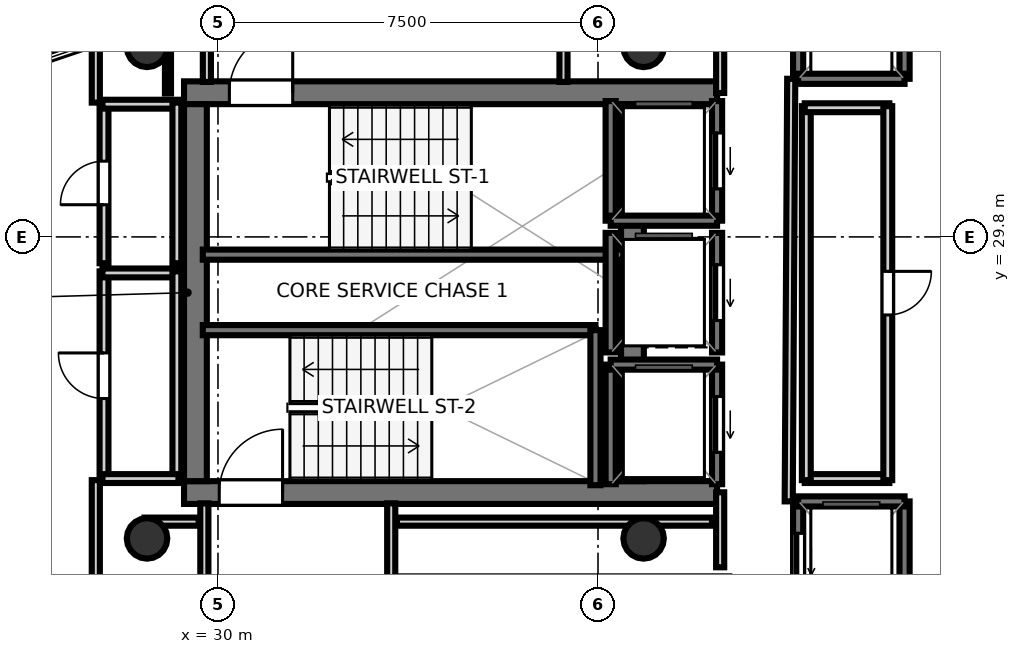
"""IFC4 building model, lengths in metres.
Left out: names, types, materials, properties, quantities, classifications, styles, units other than length and angle.
Written with IfcOpenShell. Run it as: python <this file> out.ifc"""

import sys

from ifc_helpers import new_model, si_unit, direction, frame, frame_2d, origin, origin_2d, place, context, subcontext, project, spatial, rectangle, hollow_circle, extrude, element, fill, save


model = new_model("IFC4")
c1 = context("Model", 3, precision=1e-05, world=origin(), true_north=direction((0.0, 1.0)))
c2 = subcontext(c1, "Body", "Model", "MODEL_VIEW")
j1 = project(units=[si_unit("LENGTHUNIT", "METRE"), si_unit("PLANEANGLEUNIT", "RADIAN")], contexts=[c1])
p1 = place(None, origin())
s1 = spatial("IfcSite", under=j1, at=p1, CompositionType="ELEMENT")
p2 = place(p1, origin())
s2 = spatial("IfcBuilding", under=s1, at=p2, CompositionType="ELEMENT")
p3 = place(p2, frame((0.0, 0.0, 333.3)))
s3 = spatial("IfcBuildingStorey", under=s2, at=p3, CompositionType="ELEMENT", Elevation=333.3)
p4 = place(p3, frame((29.33, 32.645, 0.0), z_axis=(0.0, 0.0, 1.0), x_axis=(1.0, 0.0, 0.0)))
e1 = element("IfcWall", 1, at=p4, inside=s3, PredefinedType="SHEAR", context=c2, shape_type="SweptSolid", body=[
    extrude(rectangle(XDim=10.52, YDim=0.45, at=frame_2d((5.26, 0.0))), origin(), (0.0, 0.0, 1.0), 3.52),
])
p5 = place(p4, frame((0.895, 0.0, 0.0)))
e2 = element("IfcOpeningElement", 2, at=p5, cuts=e1, PredefinedType="OPENING", context=c2, shape_type="SweptSolid", body=[
    extrude(rectangle(XDim=1.25, YDim=2.15, at=frame_2d((0.625, 1.075))), frame((0.0, 0.235, 0.0), z_axis=(0.0, -1.0, 0.0), x_axis=(1.0, 0.0, 0.0)), (0.0, 0.0, 1.0), 0.47),
])
p6 = place(p3, frame((29.33, 24.755, 0.0), z_axis=(0.0, 0.0, 1.0), x_axis=(1.0, 0.0, 0.0)))
e3 = element("IfcWall", 3, at=p6, inside=s3, PredefinedType="SHEAR", context=c2, shape_type="SweptSolid", body=[
    extrude(rectangle(XDim=10.52, YDim=0.45, at=frame_2d((5.26, 0.0))), origin(), (0.0, 0.0, 1.0), 3.52),
])
p7 = place(p6, frame((0.695, 0.0, 0.0)))
e4 = element("IfcOpeningElement", 4, at=p7, cuts=e3, PredefinedType="OPENING", context=c2, shape_type="SweptSolid", body=[
    extrude(rectangle(XDim=1.25, YDim=2.15, at=frame_2d((0.625, 1.075))), frame((0.0, 0.235, 0.0), z_axis=(0.0, -1.0, 0.0), x_axis=(1.0, 0.0, 0.0)), (0.0, 0.0, 1.0), 0.47),
])
for number, where, z_axis, x_axis in (
    (5, (29.555, 24.98, 0.0), (0.0, 0.0, 1.0), (0.0, 1.0, 0.0)),
    (6, (38.18, 24.98, 0.0), (0.0, 0.0, 1.0), (0.0, 1.0, 0.0)),
):
    element("IfcWall", number, at=place(p3, frame(where, z_axis=z_axis, x_axis=x_axis)), inside=s3, PredefinedType="SHEAR", context=c2, shape_type="SweptSolid", body=[
        extrude(rectangle(XDim=7.44, YDim=0.45, at=frame_2d((3.72, 0.0))), origin(), (0.0, 0.0, 1.0), 3.52),
    ])
for number, where, z_axis, x_axis in (
    (7, (28.6, 33.55, 0.0), (0.0, 0.0, 1.0), (1.0, 0.0, 0.0)),
    (8, (28.6, 23.85, 0.0), (0.0, 0.0, 1.0), (1.0, 0.0, 0.0)),
    (9, (38.4, 33.55, 0.0), (0.0, 0.0, 1.0), (1.0, 0.0, 0.0)),
    (10, (38.4, 23.85, 0.0), (0.0, 0.0, 1.0), (1.0, 0.0, 0.0)),
):
    element("IfcColumn", number, at=place(p3, frame(where, z_axis=z_axis, x_axis=x_axis)), inside=s3, PredefinedType="COLUMN", context=c2, shape_type="SweptSolid", body=[
        extrude(hollow_circle(Radius=0.4, WallThickness=0.022, at=origin_2d()), origin(), (0.0, 0.0, 1.0), 3.7),
    ])
p8 = place(p3, frame((29.7, 29.45, 0.0), z_axis=(0.0, 0.0, 1.0), x_axis=(1.0, 0.0, 0.0)))
e11 = element("IfcWall", 11, at=p8, inside=s3, PredefinedType="SOLIDWALL", context=c2, shape_type="SweptSolid", body=[
    extrude(rectangle(XDim=8.3, YDim=0.2, at=frame_2d((4.15, 0.0))), origin(), (0.0, 0.0, 1.0), 3.52),
])
p9 = place(p3, frame((29.7, 27.96, 0.0), z_axis=(0.0, 0.0, 1.0), x_axis=(1.0, 0.0, 0.0)))
e12 = element("IfcWall", 12, at=p9, inside=s3, PredefinedType="SOLIDWALL", context=c2, shape_type="SweptSolid", body=[
    extrude(rectangle(XDim=7.75, YDim=0.2, at=frame_2d((3.875, 0.0))), origin(), (0.0, 0.0, 1.0), 3.52),
])
p10 = place(p3, frame((37.45, 24.9, 0.0), z_axis=(0.0, 0.0, 1.0), x_axis=(0.0, 1.0, 0.0)))
e13 = element("IfcWall", 13, at=p10, inside=s3, PredefinedType="SOLIDWALL", context=c2, shape_type="SweptSolid", body=[
    extrude(rectangle(XDim=3.06, YDim=0.2, at=frame_2d((1.53, 0.0))), origin(), (0.0, 0.0, 1.0), 3.52),
])
p11 = place(p3, frame((39.85, 30.12, 0.0), z_axis=(0.0, 0.0, 1.0), x_axis=(0.0, 1.0, 0.0)))
e14 = element("IfcWall", 14, at=p11, inside=s3, PredefinedType="SOLIDWALL", context=c2, shape_type="SweptSolid", body=[
    extrude(rectangle(XDim=2.36, YDim=0.2, at=frame_2d((1.18, 0.0))), origin(), (0.0, 0.0, 1.0), 3.52),
])
p12 = place(p11, frame((0.63, 0.0, 0.0)))
e15 = element("IfcOpeningElement", 15, at=p12, cuts=e14, PredefinedType="OPENING", context=c2, shape_type="SweptSolid", body=[
    extrude(rectangle(XDim=1.1, YDim=2.15, at=frame_2d((0.55, 1.075))), frame((0.0, 0.11, 0.0), z_axis=(0.0, -1.0, 0.0), x_axis=(1.0, 0.0, 0.0)), (0.0, 0.0, 1.0), 0.22),
])
p13 = place(p3, frame((37.75, 30.12, 0.0), z_axis=(0.0, 0.0, 1.0), x_axis=(0.0, 1.0, 0.0)))
e16 = element("IfcWall", 16, at=p13, inside=s3, PredefinedType="SOLIDWALL", context=c2, shape_type="SweptSolid", body=[
    extrude(rectangle(XDim=2.36, YDim=0.2, at=frame_2d((1.18, 0.0))), origin(), (0.0, 0.0, 1.0), 3.52),
])
p14 = place(p3, frame((37.75, 30.12, 0.0), z_axis=(0.0, 0.0, 1.0), x_axis=(1.0, 0.0, 0.0)))
e17 = element("IfcWall", 17, at=p14, inside=s3, PredefinedType="SOLIDWALL", context=c2, shape_type="SweptSolid", body=[
    extrude(rectangle(XDim=2.1, YDim=0.2, at=frame_2d((1.05, 0.0))), origin(), (0.0, 0.0, 1.0), 3.52),
])
p15 = place(p3, frame((39.85, 24.92, 0.0), z_axis=(0.0, 0.0, 1.0), x_axis=(0.0, 1.0, 0.0)))
e18 = element("IfcWall", 18, at=p15, inside=s3, PredefinedType="SOLIDWALL", context=c2, shape_type="SweptSolid", body=[
    extrude(rectangle(XDim=2.36, YDim=0.2, at=frame_2d((1.18, 0.0))), origin(), (0.0, 0.0, 1.0), 3.52),
])
p16 = place(p15, frame((0.63, 0.0, 0.0)))
e19 = element("IfcOpeningElement", 19, at=p16, cuts=e18, PredefinedType="OPENING", context=c2, shape_type="SweptSolid", body=[
    extrude(rectangle(XDim=1.1, YDim=2.15, at=frame_2d((0.55, 1.075))), frame((0.0, 0.11, 0.0), z_axis=(0.0, -1.0, 0.0), x_axis=(1.0, 0.0, 0.0)), (0.0, 0.0, 1.0), 0.22),
])
p17 = place(p3, frame((37.75, 24.92, 0.0), z_axis=(0.0, 0.0, 1.0), x_axis=(0.0, 1.0, 0.0)))
e20 = element("IfcWall", 20, at=p17, inside=s3, PredefinedType="SOLIDWALL", context=c2, shape_type="SweptSolid", body=[
    extrude(rectangle(XDim=2.36, YDim=0.2, at=frame_2d((1.18, 0.0))), origin(), (0.0, 0.0, 1.0), 3.52),
])
p18 = place(p3, frame((37.75, 27.28, 0.0), z_axis=(0.0, 0.0, 1.0), x_axis=(1.0, 0.0, 0.0)))
e21 = element("IfcWall", 21, at=p18, inside=s3, PredefinedType="SOLIDWALL", context=c2, shape_type="SweptSolid", body=[
    extrude(rectangle(XDim=2.1, YDim=0.2, at=frame_2d((1.05, 0.0))), origin(), (0.0, 0.0, 1.0), 3.52),
])
p19 = place(p3, frame((39.85, 27.52, 0.0), z_axis=(0.0, 0.0, 1.0), x_axis=(0.0, 1.0, 0.0)))
e22 = element("IfcWall", 22, at=p19, inside=s3, PredefinedType="SOLIDWALL", context=c2, shape_type="SweptSolid", body=[
    extrude(rectangle(XDim=2.36, YDim=0.2, at=frame_2d((1.18, 0.0))), origin(), (0.0, 0.0, 1.0), 3.52),
])
p20 = place(p19, frame((0.63, 0.0, 0.0)))
e23 = element("IfcOpeningElement", 23, at=p20, cuts=e22, PredefinedType="OPENING", context=c2, shape_type="SweptSolid", body=[
    extrude(rectangle(XDim=1.1, YDim=2.15, at=frame_2d((0.55, 1.075))), frame((0.0, 0.11, 0.0), z_axis=(0.0, -1.0, 0.0), x_axis=(1.0, 0.0, 0.0)), (0.0, 0.0, 1.0), 0.22),
])
p21 = place(p3, frame((37.75, 27.52, 0.0), z_axis=(0.0, 0.0, 1.0), x_axis=(0.0, 1.0, 0.0)))
e24 = element("IfcWall", 24, at=p21, inside=s3, PredefinedType="SOLIDWALL", context=c2, shape_type="SweptSolid", body=[
    extrude(rectangle(XDim=2.36, YDim=0.2, at=frame_2d((1.18, 0.0))), origin(), (0.0, 0.0, 1.0), 3.52),
])
p22 = place(p3, frame((43.55, 22.22, 0.0), z_axis=(0.0, 0.0, 1.0), x_axis=(0.0, 1.0, 0.0)))
e25 = element("IfcWall", 25, at=p22, inside=s3, PredefinedType="SOLIDWALL", context=c2, shape_type="SweptSolid", body=[
    extrude(rectangle(XDim=2.36, YDim=0.2, at=frame_2d((1.18, 0.0))), origin(), (0.0, 0.0, 1.0), 3.52),
])
p23 = place(p3, frame((41.45, 22.22, 0.0), z_axis=(0.0, 0.0, 1.0), x_axis=(0.0, 1.0, 0.0)))
e26 = element("IfcWall", 26, at=p23, inside=s3, PredefinedType="SOLIDWALL", context=c2, shape_type="SweptSolid", body=[
    extrude(rectangle(XDim=2.36, YDim=0.2, at=frame_2d((1.18, 0.0))), origin(), (0.0, 0.0, 1.0), 3.52),
])
p24 = place(p23, frame((0.63, 0.0, 0.0)))
e27 = element("IfcOpeningElement", 27, at=p24, cuts=e26, PredefinedType="OPENING", context=c2, shape_type="SweptSolid", body=[
    extrude(rectangle(XDim=1.1, YDim=2.15, at=frame_2d((0.55, 1.075))), frame((0.0, 0.11, 0.0), z_axis=(0.0, -1.0, 0.0), x_axis=(1.0, 0.0, 0.0)), (0.0, 0.0, 1.0), 0.22),
])
p25 = place(p3, frame((41.45, 24.58, 0.0), z_axis=(0.0, 0.0, 1.0), x_axis=(1.0, 0.0, 0.0)))
e28 = element("IfcWall", 28, at=p25, inside=s3, PredefinedType="SOLIDWALL", context=c2, shape_type="SweptSolid", body=[
    extrude(rectangle(XDim=2.1, YDim=0.2, at=frame_2d((1.05, 0.0))), origin(), (0.0, 0.0, 1.0), 3.52),
])
p26 = place(p3, frame((43.55, 32.92, 0.0), z_axis=(0.0, 0.0, 1.0), x_axis=(0.0, 1.0, 0.0)))
e29 = element("IfcWall", 29, at=p26, inside=s3, PredefinedType="SOLIDWALL", context=c2, shape_type="SweptSolid", body=[
    extrude(rectangle(XDim=2.36, YDim=0.2, at=frame_2d((1.18, 0.0))), origin(), (0.0, 0.0, 1.0), 3.52),
])
p27 = place(p3, frame((41.45, 32.92, 0.0), z_axis=(0.0, 0.0, 1.0), x_axis=(0.0, 1.0, 0.0)))
e30 = element("IfcWall", 30, at=p27, inside=s3, PredefinedType="SOLIDWALL", context=c2, shape_type="SweptSolid", body=[
    extrude(rectangle(XDim=2.36, YDim=0.2, at=frame_2d((1.18, 0.0))), origin(), (0.0, 0.0, 1.0), 3.52),
])
p28 = place(p27, frame((0.63, 0.0, 0.0)))
e31 = element("IfcOpeningElement", 31, at=p28, cuts=e30, PredefinedType="OPENING", context=c2, shape_type="SweptSolid", body=[
    extrude(rectangle(XDim=1.1, YDim=2.15, at=frame_2d((0.55, 1.075))), frame((0.0, 0.11, 0.0), z_axis=(0.0, -1.0, 0.0), x_axis=(1.0, 0.0, 0.0)), (0.0, 0.0, 1.0), 0.22),
])
p29 = place(p3, frame((41.45, 32.92, 0.0), z_axis=(0.0, 0.0, 1.0), x_axis=(1.0, 0.0, 0.0)))
e32 = element("IfcWall", 32, at=p29, inside=s3, PredefinedType="SOLIDWALL", context=c2, shape_type="SweptSolid", body=[
    extrude(rectangle(XDim=2.1, YDim=0.2, at=frame_2d((1.05, 0.0))), origin(), (0.0, 0.0, 1.0), 3.52),
])
p30 = place(p3, frame((36.819, 36.785, 0.0), z_axis=(0.0, 0.0, 1.0), x_axis=(0.0, -1.0, 0.0)))
e33 = element("IfcWall", 33, at=p30, inside=s3, PredefinedType="PARTITIONING", context=c2, shape_type="SweptSolid", body=[
    extrude(rectangle(XDim=3.927, YDim=0.16, at=frame_2d((1.964, 0.0))), origin(), (0.0, 0.0, 1.0), 2.84),
])
p31 = place(p3, frame((29.781, 32.858, 0.0), z_axis=(0.0, 0.0, 1.0), x_axis=(0.0, 1.0, 0.0)))
e34 = element("IfcWall", 34, at=p31, inside=s3, PredefinedType="PARTITIONING", context=c2, shape_type="SweptSolid", body=[
    extrude(rectangle(XDim=1.547, YDim=0.16, at=frame_2d((0.773, 0.0))), origin(), (0.0, 0.0, 1.0), 2.84),
])
for number, where, z_axis, x_axis in (
    (35, (29.731, 21.85, 0.0), (0.0, 0.0, 1.0), (0.0, 1.0, 0.0)),
    (36, (33.419, 24.542, 0.0), (0.0, 0.0, 1.0), (0.0, -1.0, 0.0)),
):
    element("IfcWall", number, at=place(p3, frame(where, z_axis=z_axis, x_axis=x_axis)), inside=s3, PredefinedType="PARTITIONING", context=c2, shape_type="SweptSolid", body=[
        extrude(rectangle(XDim=2.692, YDim=0.16, at=frame_2d((1.346, 0.0))), origin(), (0.0, 0.0, 1.0), 2.84),
    ])
p32 = place(p3, frame((39.911, 23.28, 0.0), z_axis=(0.0, 0.0, 1.0), x_axis=(0.0, 1.0, 0.0)))
e37 = element("IfcWall", 37, at=p32, inside=s3, PredefinedType="PARTITIONING", context=c2, shape_type="SweptSolid", body=[
    extrude(rectangle(XDim=1.48, YDim=0.16, at=frame_2d((0.74, 0.0))), origin(), (0.0, 0.0, 1.0), 2.84),
])
p33 = place(p3, frame((39.911, 32.64, 0.0), z_axis=(0.0, 0.0, 1.0), x_axis=(0.0, 1.0, 0.0)))
e38 = element("IfcWall", 38, at=p33, inside=s3, PredefinedType="PARTITIONING", context=c2, shape_type="SweptSolid", body=[
    extrude(rectangle(XDim=2.88, YDim=0.16, at=frame_2d((1.44, 0.0))), origin(), (0.0, 0.0, 1.0), 2.84),
])
p34 = place(p3, frame((41.313, 32.92, 0.0), z_axis=(0.0, 0.0, 1.0), x_axis=(-0.005942518022, -0.999982343084, 0.0)))
e39 = element("IfcWall", 39, at=p34, inside=s3, PredefinedType="PARTITIONING", context=c2, shape_type="SweptSolid", body=[
    extrude(rectangle(XDim=8.34, YDim=0.16, at=frame_2d((4.17, 0.0))), origin(), (0.0, 0.0, 1.0), 2.84),
])
p35 = place(p3, frame((43.25, 25.031, 0.0), z_axis=(0.0, 0.0, 1.0), x_axis=(-1.0, 0.0, 0.0)))
e40 = element("IfcWall", 40, at=p35, inside=s3, PredefinedType="PLUMBINGWALL", context=c2, shape_type="SweptSolid", body=[
    extrude(rectangle(XDim=1.67, YDim=0.175, at=frame_2d((0.835, 0.0))), origin(), (0.0, 0.0, 1.0), 2.84),
])
p36 = place(p3, frame((41.611, 25.0, 0.0), z_axis=(0.0, 0.0, 1.0), x_axis=(0.0, 1.0, 0.0)))
e41 = element("IfcWall", 41, at=p36, inside=s3, PredefinedType="PLUMBINGWALL", context=c2, shape_type="SweptSolid", body=[
    extrude(rectangle(XDim=7.38, YDim=0.175, at=frame_2d((3.69, 0.0))), origin(), (0.0, 0.0, 1.0), 2.84),
])
p37 = place(p3, frame((41.58, 32.349, 0.0), z_axis=(0.0, 0.0, 1.0), x_axis=(1.0, 0.0, 0.0)))
e42 = element("IfcWall", 42, at=p37, inside=s3, PredefinedType="PLUMBINGWALL", context=c2, shape_type="SweptSolid", body=[
    extrude(rectangle(XDim=1.67, YDim=0.175, at=frame_2d((0.835, 0.0))), origin(), (0.0, 0.0, 1.0), 2.84),
])
p38 = place(p3, frame((43.219, 32.38, 0.0), z_axis=(0.0, 0.0, 1.0), x_axis=(0.0, -1.0, 0.0)))
e43 = element("IfcWall", 43, at=p38, inside=s3, PredefinedType="PLUMBINGWALL", context=c2, shape_type="SweptSolid", body=[
    extrude(rectangle(XDim=7.38, YDim=0.175, at=frame_2d((3.69, 0.0))), origin(), (0.0, 0.0, 1.0), 2.84),
])
p39 = place(p38, frame((3.26, 0.0, 0.0)))
e44 = element("IfcOpeningElement", 44, at=p39, cuts=e43, PredefinedType="OPENING", context=c2, shape_type="SweptSolid", body=[
    extrude(rectangle(XDim=0.86, YDim=2.05, at=frame_2d((0.43, 1.025))), frame((0.0, 0.097, 0.0), z_axis=(0.0, -1.0, 0.0), x_axis=(1.0, 0.0, 0.0)), (0.0, 0.0, 1.0), 0.195),
])
p40 = place(p3, frame((27.751, 25.0, 0.0), z_axis=(0.0, 0.0, 1.0), x_axis=(0.0, 1.0, 0.0)))
e45 = element("IfcWall", 45, at=p40, inside=s3, PredefinedType="PLUMBINGWALL", context=c2, shape_type="SweptSolid", body=[
    extrude(rectangle(XDim=4.12, YDim=0.175, at=frame_2d((2.06, 0.0))), origin(), (0.0, 0.0, 1.0), 2.84),
])
p41 = place(p40, frame((1.61, 0.0, 0.0)))
e46 = element("IfcOpeningElement", 46, at=p41, cuts=e45, PredefinedType="OPENING", context=c2, shape_type="SweptSolid", body=[
    extrude(rectangle(XDim=0.9, YDim=2.1, at=frame_2d((0.45, 1.05))), frame((0.0, 0.097, 0.0), z_axis=(0.0, -1.0, 0.0), x_axis=(1.0, 0.0, 0.0)), (0.0, 0.0, 1.0), 0.195),
])
p42 = place(p3, frame((27.72, 29.089, 0.0), z_axis=(0.0, 0.0, 1.0), x_axis=(1.0, 0.0, 0.0)))
e47 = element("IfcWall", 47, at=p42, inside=s3, PredefinedType="PLUMBINGWALL", context=c2, shape_type="SweptSolid", body=[
    extrude(rectangle(XDim=1.5, YDim=0.175, at=frame_2d((0.75, 0.0))), origin(), (0.0, 0.0, 1.0), 2.84),
])
p43 = place(p3, frame((29.189, 29.12, 0.0), z_axis=(0.0, 0.0, 1.0), x_axis=(0.0, -1.0, 0.0)))
e48 = element("IfcWall", 48, at=p43, inside=s3, PredefinedType="PLUMBINGWALL", context=c2, shape_type="SweptSolid", body=[
    extrude(rectangle(XDim=4.12, YDim=0.175, at=frame_2d((2.06, 0.0))), origin(), (0.0, 0.0, 1.0), 2.84),
])
p44 = place(p3, frame((29.22, 25.031, 0.0), z_axis=(0.0, 0.0, 1.0), x_axis=(-1.0, 0.0, 0.0)))
e49 = element("IfcWall", 49, at=p44, inside=s3, PredefinedType="PLUMBINGWALL", context=c2, shape_type="SweptSolid", body=[
    extrude(rectangle(XDim=1.5, YDim=0.175, at=frame_2d((0.75, 0.0))), origin(), (0.0, 0.0, 1.0), 2.84),
])
p45 = place(p3, frame((27.751, 29.28, 0.0), z_axis=(0.0, 0.0, 1.0), x_axis=(0.0, 1.0, 0.0)))
e50 = element("IfcWall", 50, at=p45, inside=s3, PredefinedType="PLUMBINGWALL", context=c2, shape_type="SweptSolid", body=[
    extrude(rectangle(XDim=3.17, YDim=0.175, at=frame_2d((1.585, 0.0))), origin(), (0.0, 0.0, 1.0), 2.84),
])
p46 = place(p45, frame((1.155, 0.0, 0.0)))
e51 = element("IfcOpeningElement", 51, at=p46, cuts=e50, PredefinedType="OPENING", context=c2, shape_type="SweptSolid", body=[
    extrude(rectangle(XDim=0.86, YDim=2.05, at=frame_2d((0.43, 1.025))), frame((0.0, 0.097, 0.0), z_axis=(0.0, -1.0, 0.0), x_axis=(1.0, 0.0, 0.0)), (0.0, 0.0, 1.0), 0.195),
])
p47 = place(p3, frame((27.72, 32.419, 0.0), z_axis=(0.0, 0.0, 1.0), x_axis=(1.0, 0.0, 0.0)))
e52 = element("IfcWall", 52, at=p47, inside=s3, PredefinedType="PLUMBINGWALL", context=c2, shape_type="SweptSolid", body=[
    extrude(rectangle(XDim=1.5, YDim=0.175, at=frame_2d((0.75, 0.0))), origin(), (0.0, 0.0, 1.0), 2.84),
])
p48 = place(p3, frame((29.189, 32.45, 0.0), z_axis=(0.0, 0.0, 1.0), x_axis=(0.0, -1.0, 0.0)))
e53 = element("IfcWall", 53, at=p48, inside=s3, PredefinedType="PLUMBINGWALL", context=c2, shape_type="SweptSolid", body=[
    extrude(rectangle(XDim=3.17, YDim=0.175, at=frame_2d((1.585, 0.0))), origin(), (0.0, 0.0, 1.0), 2.84),
])
p49 = place(p3, frame((29.62, 24.181, 0.0), z_axis=(0.0, 0.0, 1.0), x_axis=(-1.0, 0.0, 0.0)))
e54 = element("IfcWall", 54, at=p49, inside=s3, PredefinedType="PARTITIONING", context=c2, shape_type="SweptSolid", body=[
    extrude(rectangle(XDim=1.07, YDim=0.16, at=frame_2d((0.535, 0.0))), origin(), (0.0, 0.0, 1.0), 2.84),
])
p50 = place(p3, frame((39.75, 24.181, 0.0), z_axis=(0.0, 0.0, 1.0), x_axis=(-1.0, 0.0, 0.0)))
e55 = element("IfcWall", 55, at=p50, inside=s3, PredefinedType="PARTITIONING", context=c2, shape_type="SweptSolid", body=[
    extrude(rectangle(XDim=6.22, YDim=0.16, at=frame_2d((3.11, 0.0))), origin(), (0.0, 0.0, 1.0), 2.84),
])
p51 = place(p3, frame((27.589, 33.664, 0.0), z_axis=(0.0, 0.0, 1.0), x_axis=(0.0, -1.0, 0.0)))
e56 = element("IfcWall", 56, at=p51, inside=s3, PredefinedType="PARTITIONING", context=c2, shape_type="SweptSolid", body=[
    extrude(rectangle(XDim=1.214, YDim=0.16, at=frame_2d((0.607, 0.0))), origin(), (0.0, 0.0, 1.0), 2.84),
])
p52 = place(p3, frame((27.589, 25.0, 0.0), z_axis=(0.0, 0.0, 1.0), x_axis=(0.0, -1.0, 0.0)))
e57 = element("IfcWall", 57, at=p52, inside=s3, PredefinedType="PARTITIONING", context=c2, shape_type="SweptSolid", body=[
    extrude(rectangle(XDim=3.22, YDim=0.16, at=frame_2d((1.61, 0.0))), origin(), (0.0, 0.0, 1.0), 2.84),
])
p53 = place(p3, frame((29.013, 32.63, 0.0), z_axis=(0.0, 0.0, 1.0), x_axis=(0.0, 1.0, 0.0)))
e58 = element("IfcWall", 58, at=p53, inside=s3, PredefinedType="PARTITIONING", context=c2, shape_type="SweptSolid", body=[
    extrude(rectangle(XDim=1.515, YDim=0.12, at=frame_2d((0.758, 0.0))), origin(), (0.0, 0.0, 1.0), 2.84),
])
p54 = place(p5, origin())
e59 = element("IfcDoor", 59, at=p54, inside=s3, OperationType="SINGLE_SWING_RIGHT", PredefinedType="DOOR", context=c2, shape_type="SweptSolid", body=[
    extrude(rectangle(XDim=1.25, YDim=2.15, at=frame_2d((0.625, 1.075))), frame((0.0, 0.025, 0.0), z_axis=(0.0, -1.0, 0.0), x_axis=(1.0, 0.0, 0.0)), (0.0, 0.0, 1.0), 0.05),
])
fill(e2, e59)
p55 = place(p7, origin())
e60 = element("IfcDoor", 60, at=p55, inside=s3, OperationType="SINGLE_SWING_RIGHT", PredefinedType="DOOR", context=c2, shape_type="SweptSolid", body=[
    extrude(rectangle(XDim=1.25, YDim=2.15, at=frame_2d((0.625, 1.075))), frame((0.0, 0.025, 0.0), z_axis=(0.0, -1.0, 0.0), x_axis=(1.0, 0.0, 0.0)), (0.0, 0.0, 1.0), 0.05),
])
fill(e4, e60)
p56 = place(p12, origin())
e61 = element("IfcDoor", 61, at=p56, inside=s3, OperationType="SLIDING_TO_LEFT", PredefinedType="DOOR", context=c2, shape_type="SweptSolid", body=[
    extrude(rectangle(XDim=1.1, YDim=2.15, at=frame_2d((0.55, 1.075))), frame((0.0, 0.025, 0.0), z_axis=(0.0, -1.0, 0.0), x_axis=(1.0, 0.0, 0.0)), (0.0, 0.0, 1.0), 0.05),
])
fill(e15, e61)
p57 = place(p16, origin())
e62 = element("IfcDoor", 62, at=p57, inside=s3, OperationType="SLIDING_TO_LEFT", PredefinedType="DOOR", context=c2, shape_type="SweptSolid", body=[
    extrude(rectangle(XDim=1.1, YDim=2.15, at=frame_2d((0.55, 1.075))), frame((0.0, 0.025, 0.0), z_axis=(0.0, -1.0, 0.0), x_axis=(1.0, 0.0, 0.0)), (0.0, 0.0, 1.0), 0.05),
])
fill(e19, e62)
p58 = place(p20, origin())
e63 = element("IfcDoor", 63, at=p58, inside=s3, OperationType="SLIDING_TO_LEFT", PredefinedType="DOOR", context=c2, shape_type="SweptSolid", body=[
    extrude(rectangle(XDim=1.1, YDim=2.15, at=frame_2d((0.55, 1.075))), frame((0.0, 0.025, 0.0), z_axis=(0.0, -1.0, 0.0), x_axis=(1.0, 0.0, 0.0)), (0.0, 0.0, 1.0), 0.05),
])
fill(e23, e63)
p59 = place(p24, origin())
e64 = element("IfcDoor", 64, at=p59, inside=s3, OperationType="SLIDING_TO_LEFT", PredefinedType="DOOR", context=c2, shape_type="SweptSolid", body=[
    extrude(rectangle(XDim=1.1, YDim=2.15, at=frame_2d((0.55, 1.075))), frame((0.0, 0.025, 0.0), z_axis=(0.0, -1.0, 0.0), x_axis=(1.0, 0.0, 0.0)), (0.0, 0.0, 1.0), 0.05),
])
fill(e27, e64)
p60 = place(p41, origin())
e65 = element("IfcDoor", 65, at=p60, inside=s3, OperationType="SINGLE_SWING_RIGHT", PredefinedType="DOOR", context=c2, shape_type="SweptSolid", body=[
    extrude(rectangle(XDim=0.9, YDim=2.1, at=frame_2d((0.45, 1.05))), frame((0.0, 0.025, 0.0), z_axis=(0.0, -1.0, 0.0), x_axis=(1.0, 0.0, 0.0)), (0.0, 0.0, 1.0), 0.05),
])
fill(e46, e65)
p61 = place(p46, origin())
e66 = element("IfcDoor", 66, at=p61, inside=s3, OperationType="SINGLE_SWING_LEFT", PredefinedType="DOOR", context=c2, shape_type="SweptSolid", body=[
    extrude(rectangle(XDim=0.86, YDim=2.05, at=frame_2d((0.43, 1.025))), frame((0.0, 0.025, 0.0), z_axis=(0.0, -1.0, 0.0), x_axis=(1.0, 0.0, 0.0)), (0.0, 0.0, 1.0), 0.05),
])
fill(e51, e66)
p62 = place(p39, origin())
e67 = element("IfcDoor", 67, at=p62, inside=s3, OperationType="SINGLE_SWING_LEFT", PredefinedType="DOOR", context=c2, shape_type="SweptSolid", body=[
    extrude(rectangle(XDim=0.86, YDim=2.05, at=frame_2d((0.43, 1.025))), frame((0.0, 0.025, 0.0), z_axis=(0.0, -1.0, 0.0), x_axis=(1.0, 0.0, 0.0)), (0.0, 0.0, 1.0), 0.05),
])
fill(e44, e67)
save(model, sys.argv[1])
